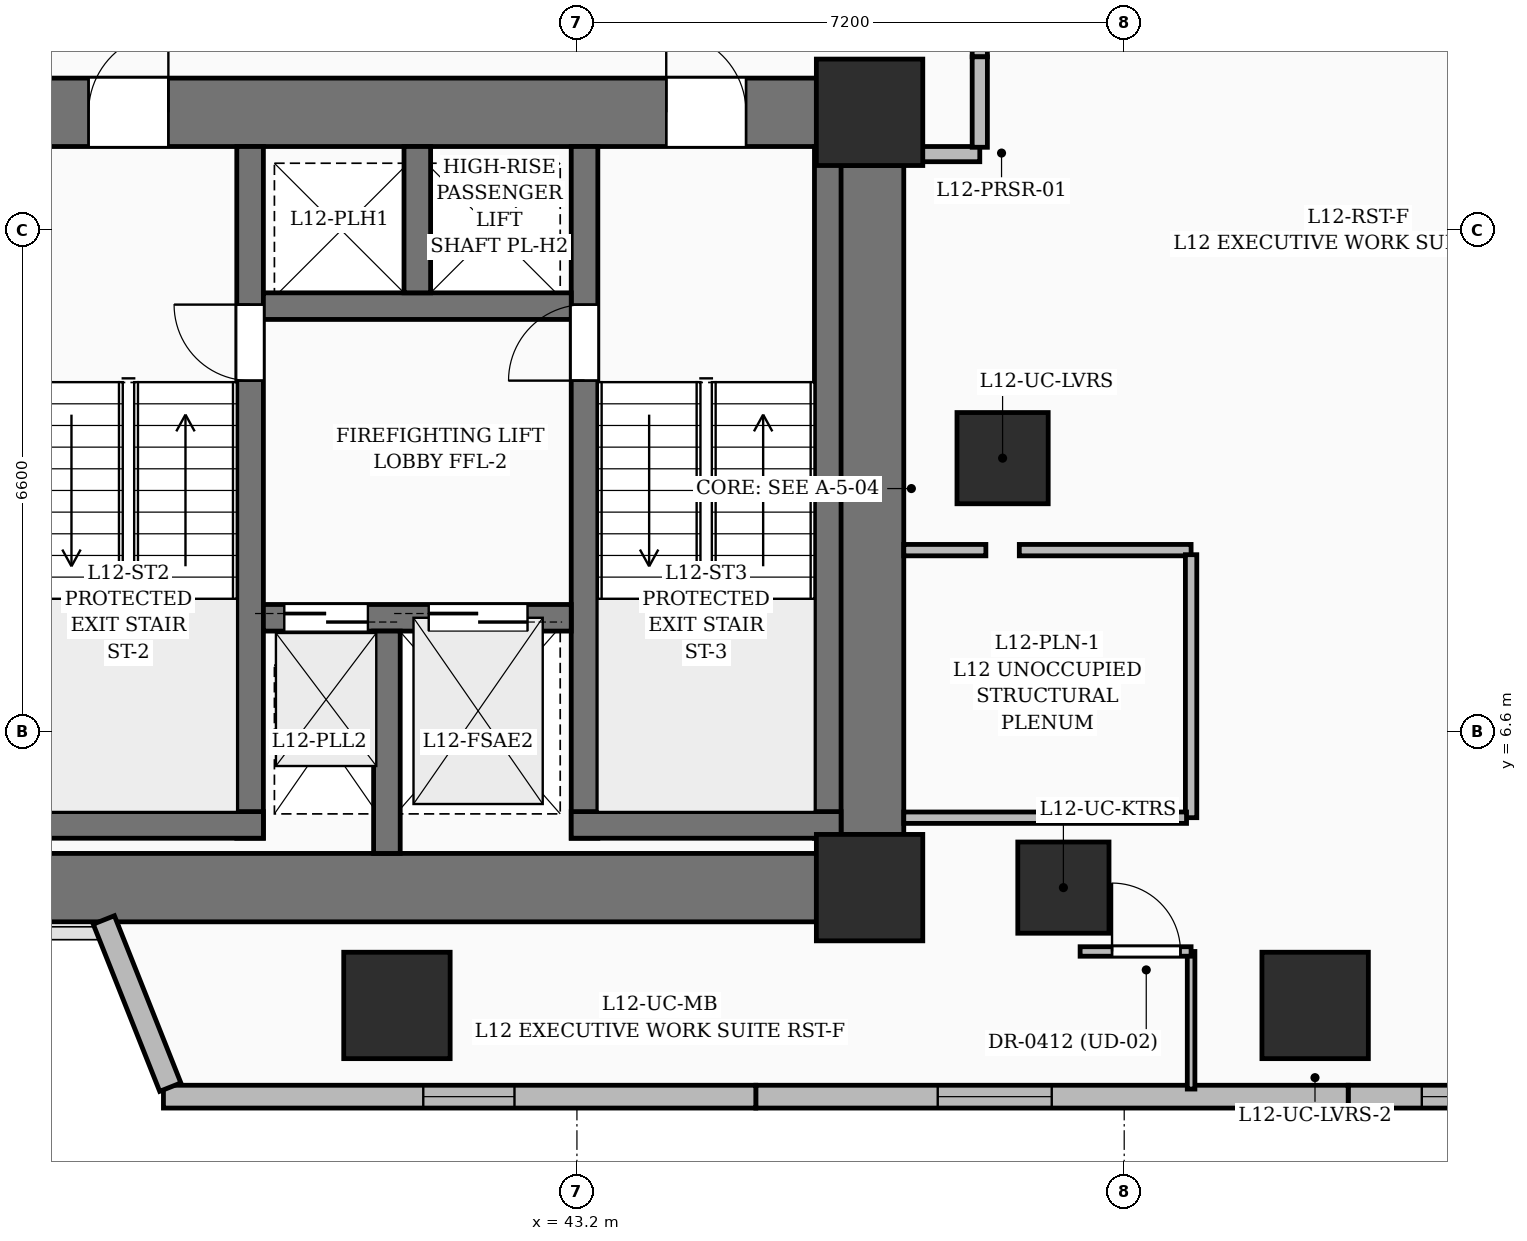
"""IFC4 building model, lengths in metres.
Left out: names, types, materials, properties, quantities, classifications, styles, units other than length and angle.
Written with IfcOpenShell. Run it as: python <this file> out.ifc"""

import sys

from ifc_helpers import new_model, si_unit, direction, frame, frame_2d, origin, origin_2d, place, context, subcontext, project, spatial, rectangle, extrude, element, fill, save


model = new_model("IFC4")
c1 = context("Model", 3, precision=1e-05, world=origin(), true_north=direction((0.0, 1.0)))
c2 = subcontext(c1, "Body", "Model", "MODEL_VIEW")
j1 = project(units=[si_unit("LENGTHUNIT", "METRE"), si_unit("PLANEANGLEUNIT", "RADIAN")], contexts=[c1])
p1 = place(None, origin())
s1 = spatial("IfcSite", under=j1, at=p1, CompositionType="ELEMENT")
p2 = place(p1, origin())
s2 = spatial("IfcBuilding", under=s1, at=p2, CompositionType="ELEMENT")
p3 = place(p2, frame((0.0, 0.0, 53.4)))
s3 = spatial("IfcBuildingStorey", under=s2, at=p3, CompositionType="ELEMENT", Elevation=53.4)
for number, where, z_axis, x_axis in (
    (1, (47.05, 4.55, 0.0), (0.0, 0.0, 1.0), (1.0, 0.0, 0.0)),
    (2, (47.05, 14.75, 0.0), (0.0, 0.0, 1.0), (1.0, 0.0, 0.0)),
):
    element("IfcColumn", number, at=place(p3, frame(where, z_axis=z_axis, x_axis=x_axis)), inside=s3, PredefinedType="COLUMN", context=c2, shape_type="SweptSolid", body=[
        extrude(rectangle(XDim=1.4, YDim=1.4, at=origin_2d()), origin(), (0.0, 0.0, 1.0), 3.6),
    ])
for number, where, z_axis, x_axis in (
    (3, (49.6, 4.55, 0.0), (0.0, 0.0, 1.0), (1.0, 0.0, 0.0)),
    (4, (48.8, 10.2, 0.0), (0.0, 0.0, 1.0), (1.0, 0.0, 0.0)),
):
    element("IfcColumn", number, at=place(p3, frame(where, z_axis=z_axis, x_axis=x_axis)), inside=s3, PredefinedType="COLUMN", context=c2, shape_type="SweptSolid", body=[
        extrude(rectangle(XDim=1.2, YDim=1.2, at=origin_2d()), origin(), (0.0, 0.0, 1.0), 3.6),
    ])
p4 = place(p3, frame((35.85, 4.55, 0.0), z_axis=(0.0, 0.0, 1.0), x_axis=(1.0, 0.0, 0.0)))
e5 = element("IfcWall", 5, at=p4, inside=s3, PredefinedType="SHEAR", context=c2, shape_type="SweptSolid", body=[
    extrude(rectangle(XDim=10.5, YDim=0.9, at=frame_2d((5.25, 0.0))), origin(), (0.0, 0.0, 1.0), 3.6),
])
p5 = place(p3, frame((35.85, 14.75, 0.0), z_axis=(0.0, 0.0, 1.0), x_axis=(1.0, 0.0, 0.0)))
e6 = element("IfcWall", 6, at=p5, inside=s3, PredefinedType="SHEAR", context=c2, shape_type="SweptSolid", body=[
    extrude(rectangle(XDim=10.5, YDim=0.9, at=frame_2d((5.25, 0.0))), origin(), (0.0, 0.0, 1.0), 3.6),
])
p6 = place(p5, frame((0.925, 0.0, 0.0)))
e7 = element("IfcOpeningElement", 7, at=p6, cuts=e6, PredefinedType="OPENING", context=c2, shape_type="SweptSolid", body=[
    extrude(rectangle(XDim=1.05, YDim=2.15, at=frame_2d((0.525, 1.075))), frame((0.0, 0.46, 0.0), z_axis=(0.0, -1.0, 0.0), x_axis=(1.0, 0.0, 0.0)), (0.0, 0.0, 1.0), 0.92),
])
p7 = place(p5, frame((8.525, 0.0, 0.0)))
e8 = element("IfcOpeningElement", 8, at=p7, cuts=e6, PredefinedType="OPENING", context=c2, shape_type="SweptSolid", body=[
    extrude(rectangle(XDim=1.05, YDim=2.15, at=frame_2d((0.525, 1.075))), frame((0.0, 0.46, 0.0), z_axis=(0.0, -1.0, 0.0), x_axis=(1.0, 0.0, 0.0)), (0.0, 0.0, 1.0), 0.92),
])
p8 = place(p3, frame((47.05, 5.25, 0.0), z_axis=(0.0, 0.0, 1.0), x_axis=(0.0, 1.0, 0.0)))
e9 = element("IfcWall", 9, at=p8, inside=s3, PredefinedType="SHEAR", context=c2, shape_type="SweptSolid", body=[
    extrude(rectangle(XDim=8.8, YDim=0.9, at=frame_2d((4.4, 0.0))), origin(), (0.0, 0.0, 1.0), 3.6),
])
p9 = place(p3, frame((38.9, 5.2, 0.0), z_axis=(0.0, 0.0, 1.0), x_axis=(0.0, 1.0, 0.0)))
e10 = element("IfcWall", 10, at=p9, inside=s3, PredefinedType="SOLIDWALL", context=c2, shape_type="SweptSolid", body=[
    extrude(rectangle(XDim=9.1, YDim=0.35, at=frame_2d((4.55, 0.0))), origin(), (0.0, 0.0, 1.0), 3.6),
])
p10 = place(p9, frame((6.02, 0.0, 0.0)))
e11 = element("IfcOpeningElement", 11, at=p10, cuts=e10, PredefinedType="OPENING", context=c2, shape_type="SweptSolid", body=[
    extrude(rectangle(XDim=1.0, YDim=2.15, at=frame_2d((0.5, 1.075))), frame((0.0, 0.185, 0.0), z_axis=(0.0, -1.0, 0.0), x_axis=(1.0, 0.0, 0.0)), (0.0, 0.0, 1.0), 0.37),
])
p11 = place(p3, frame((35.525, 5.375, 0.0), z_axis=(0.0, 0.0, 1.0), x_axis=(1.0, 0.0, 0.0)))
e12 = element("IfcWall", 12, at=p11, inside=s3, PredefinedType="SOLIDWALL", context=c2, shape_type="SweptSolid", body=[
    extrude(rectangle(XDim=3.55, YDim=0.35, at=frame_2d((1.775, 0.0))), origin(), (0.0, 0.0, 1.0), 3.6),
])
p12 = place(p3, frame((43.3, 5.2, 0.0), z_axis=(0.0, 0.0, 1.0), x_axis=(0.0, 1.0, 0.0)))
e13 = element("IfcWall", 13, at=p12, inside=s3, PredefinedType="SOLIDWALL", context=c2, shape_type="SweptSolid", body=[
    extrude(rectangle(XDim=9.1, YDim=0.35, at=frame_2d((4.55, 0.0))), origin(), (0.0, 0.0, 1.0), 3.6),
])
p13 = place(p12, frame((6.02, 0.0, 0.0)))
e14 = element("IfcOpeningElement", 14, at=p13, cuts=e13, PredefinedType="OPENING", context=c2, shape_type="SweptSolid", body=[
    extrude(rectangle(XDim=1.0, YDim=2.15, at=frame_2d((0.5, 1.075))), frame((0.0, 0.185, 0.0), z_axis=(0.0, -1.0, 0.0), x_axis=(1.0, 0.0, 0.0)), (0.0, 0.0, 1.0), 0.37),
])
p14 = place(p3, frame((46.5, 5.2, 0.0), z_axis=(0.0, 0.0, 1.0), x_axis=(0.0, 1.0, 0.0)))
e15 = element("IfcWall", 15, at=p14, inside=s3, PredefinedType="SOLIDWALL", context=c2, shape_type="SweptSolid", body=[
    extrude(rectangle(XDim=9.1, YDim=0.35, at=frame_2d((4.55, 0.0))), origin(), (0.0, 0.0, 1.0), 3.6),
])
p15 = place(p3, frame((43.125, 5.375, 0.0), z_axis=(0.0, 0.0, 1.0), x_axis=(1.0, 0.0, 0.0)))
e16 = element("IfcWall", 16, at=p15, inside=s3, PredefinedType="SOLIDWALL", context=c2, shape_type="SweptSolid", body=[
    extrude(rectangle(XDim=3.55, YDim=0.35, at=frame_2d((1.775, 0.0))), origin(), (0.0, 0.0, 1.0), 3.6),
])
p16 = place(p3, frame((39.075, 8.1, 0.0), z_axis=(0.0, 0.0, 1.0), x_axis=(1.0, 0.0, 0.0)))
e17 = element("IfcWall", 17, at=p16, inside=s3, PredefinedType="SOLIDWALL", context=c2, shape_type="SweptSolid", body=[
    extrude(rectangle(XDim=4.05, YDim=0.35, at=frame_2d((2.025, 0.0))), origin(), (0.0, 0.0, 1.0), 3.6),
])
p17 = place(p16, frame((2.175, 0.0, 0.0)))
e18 = element("IfcOpeningElement", 18, at=p17, cuts=e17, PredefinedType="OPENING", context=c2, shape_type="SweptSolid", body=[
    extrude(rectangle(XDim=1.3, YDim=2.25, at=frame_2d((0.65, 1.125))), frame((0.0, 0.185, 0.0), z_axis=(0.0, -1.0, 0.0), x_axis=(1.0, 0.0, 0.0)), (0.0, 0.0, 1.0), 0.37),
])
p18 = place(p16, frame((0.275, 0.0, 0.0)))
e19 = element("IfcOpeningElement", 19, at=p18, cuts=e17, PredefinedType="OPENING", context=c2, shape_type="SweptSolid", body=[
    extrude(rectangle(XDim=1.1, YDim=2.2, at=frame_2d((0.55, 1.1))), frame((0.0, 0.185, 0.0), z_axis=(0.0, -1.0, 0.0), x_axis=(1.0, 0.0, 0.0)), (0.0, 0.0, 1.0), 0.37),
])
p19 = place(p3, frame((40.7, 5.0, 0.0), z_axis=(0.0, 0.0, 1.0), x_axis=(0.0, 1.0, 0.0)))
e20 = element("IfcWall", 20, at=p19, inside=s3, PredefinedType="SOLIDWALL", context=c2, shape_type="SweptSolid", body=[
    extrude(rectangle(XDim=2.925, YDim=0.35, at=frame_2d((1.462, 0.0))), origin(), (0.0, 0.0, 1.0), 3.6),
])
p20 = place(p3, frame((39.075, 12.2, 0.0), z_axis=(0.0, 0.0, 1.0), x_axis=(1.0, 0.0, 0.0)))
e21 = element("IfcWall", 21, at=p20, inside=s3, PredefinedType="SOLIDWALL", context=c2, shape_type="SweptSolid", body=[
    extrude(rectangle(XDim=4.05, YDim=0.35, at=frame_2d((2.025, 0.0))), origin(), (0.0, 0.0, 1.0), 3.6),
])
p21 = place(p3, frame((41.1, 12.375, 0.0), z_axis=(0.0, 0.0, 1.0), x_axis=(0.0, 1.0, 0.0)))
e22 = element("IfcWall", 22, at=p21, inside=s3, PredefinedType="SOLIDWALL", context=c2, shape_type="SweptSolid", body=[
    extrude(rectangle(XDim=1.925, YDim=0.35, at=frame_2d((0.962, 0.0))), origin(), (0.0, 0.0, 1.0), 3.6),
])
for number, where, z_axis, x_axis in (
    (23, (40.832, 3.0, 0.0), (0.0, 0.0, 1.0), (1.0, 0.0, 0.0)),
    (24, (52.912, 3.0, 0.0), (0.0, 0.0, 1.0), (1.0, 0.0, 0.0)),
):
    element("IfcColumn", number, at=place(p3, frame(where, z_axis=z_axis, x_axis=x_axis)), inside=s3, PredefinedType="COLUMN", context=c2, shape_type="SweptSolid", body=[
        extrude(rectangle(XDim=1.4, YDim=1.4, at=origin_2d()), origin(), (0.0, 0.0, 1.0), 3.6),
    ])
p22 = place(p3, frame((60.535, 1.8, 0.0), z_axis=(0.0, 0.0, 1.0), x_axis=(-1.0, 0.0, 0.0)))
e25 = element("IfcWall", 25, at=p22, inside=s3, PredefinedType="SOLIDWALL", context=c2, shape_type="SweptSolid", body=[
    extrude(rectangle(XDim=7.188, YDim=0.3, at=frame_2d((3.594, 0.0))), origin(), (0.0, 0.0, 1.0), 3.35),
])
p23 = place(p22, frame((4.62, 0.0, 0.55)))
e26 = element("IfcOpeningElement", 26, at=p23, cuts=e25, PredefinedType="OPENING", context=c2, shape_type="SweptSolid", body=[
    extrude(rectangle(XDim=1.6, YDim=2.2, at=frame_2d((0.8, 1.1))), frame((0.0, 0.16, 0.0), z_axis=(0.0, -1.0, 0.0), x_axis=(1.0, 0.0, 0.0)), (0.0, 0.0, 1.0), 0.32),
])
p24 = place(p22, frame((1.745, 0.0, 0.55)))
e27 = element("IfcOpeningElement", 27, at=p24, cuts=e25, PredefinedType="OPENING", context=c2, shape_type="SweptSolid", body=[
    extrude(rectangle(XDim=1.6, YDim=2.2, at=frame_2d((0.8, 1.1))), frame((0.0, 0.16, 0.0), z_axis=(0.0, -1.0, 0.0), x_axis=(1.0, 0.0, 0.0)), (0.0, 0.0, 1.0), 0.32),
])
p25 = place(p3, frame((53.347, 1.8, 0.0), z_axis=(0.0, 0.0, 1.0), x_axis=(-1.0, 0.0, 0.0)))
e28 = element("IfcWall", 28, at=p25, inside=s3, PredefinedType="SOLIDWALL", context=c2, shape_type="SweptSolid", body=[
    extrude(rectangle(XDim=7.793, YDim=0.3, at=frame_2d((3.897, 0.0))), origin(), (0.0, 0.0, 1.0), 3.35),
])
p26 = place(p25, frame((3.9, 0.0, 0.6)))
e29 = element("IfcOpeningElement", 29, at=p26, cuts=e28, PredefinedType="OPENING", context=c2, shape_type="SweptSolid", body=[
    extrude(rectangle(XDim=1.5, YDim=2.1, at=frame_2d((0.75, 1.05))), frame((0.0, 0.16, 0.0), z_axis=(0.0, -1.0, 0.0), x_axis=(1.0, 0.0, 0.0)), (0.0, 0.0, 1.0), 0.32),
])
p27 = place(p3, frame((45.553, 1.8, 0.0), z_axis=(0.0, 0.0, 1.0), x_axis=(-1.0, 0.0, 0.0)))
e30 = element("IfcWall", 30, at=p27, inside=s3, PredefinedType="SOLIDWALL", context=c2, shape_type="SweptSolid", body=[
    extrude(rectangle(XDim=7.793, YDim=0.3, at=frame_2d((3.896, 0.0))), origin(), (0.0, 0.0, 1.0), 3.35),
])
p28 = place(p27, frame((3.175, 0.0, 0.8)))
e31 = element("IfcOpeningElement", 31, at=p28, cuts=e30, PredefinedType="OPENING", context=c2, shape_type="SweptSolid", body=[
    extrude(rectangle(XDim=1.2, YDim=1.8, at=frame_2d((0.6, 0.9))), frame((0.0, 0.16, 0.0), z_axis=(0.0, -1.0, 0.0), x_axis=(1.0, 0.0, 0.0)), (0.0, 0.0, 1.0), 0.32),
])
p29 = place(p3, frame((37.85, 1.925, 0.0), z_axis=(0.0, 0.0, 1.0), x_axis=(-0.36946923074, 0.92924296475, 0.0)))
e32 = element("IfcWall", 32, at=p29, inside=s3, PredefinedType="SOLIDWALL", context=c2, shape_type="SweptSolid", body=[
    extrude(rectangle(XDim=2.367, YDim=0.3, at=frame_2d((1.184, 0.0))), origin(), (0.0, 0.0, 1.0), 2.3),
])
p30 = place(p3, frame((47.5, 14.2, 0.0), z_axis=(0.0, 0.0, 1.0), x_axis=(1.0, 0.0, 0.0)))
e33 = element("IfcWall", 33, at=p30, inside=s3, PredefinedType="PARTITIONING", context=c2, shape_type="SweptSolid", body=[
    extrude(rectangle(XDim=1.0, YDim=0.2, at=frame_2d((0.5, 0.0))), origin(), (0.0, 0.0, 1.0), 3.35),
])
p31 = place(p3, frame((48.5, 15.48, 0.0), z_axis=(0.0, 0.0, 1.0), x_axis=(0.0, 1.0, 0.0)))
e34 = element("IfcWall", 34, at=p31, inside=s3, PredefinedType="PARTITIONING", context=c2, shape_type="SweptSolid", body=[
    extrude(rectangle(XDim=2.27, YDim=0.2, at=frame_2d((1.135, 0.0))), origin(), (0.0, 0.0, 1.0), 2.279),
])
p32 = place(p31, frame((0.685, 0.0, 0.0)))
e35 = element("IfcOpeningElement", 35, at=p32, cuts=e34, PredefinedType="OPENING", context=c2, shape_type="SweptSolid", body=[
    extrude(rectangle(XDim=0.9, YDim=2.1, at=frame_2d((0.45, 1.05))), frame((0.0, 0.11, 0.0), z_axis=(0.0, -1.0, 0.0), x_axis=(1.0, 0.0, 0.0)), (0.0, 0.0, 1.0), 0.22),
])
p33 = place(p3, frame((47.5, 8.99, 0.0), z_axis=(0.0, 0.0, 1.0), x_axis=(1.0, 0.0, 0.0)))
e36 = element("IfcWall", 36, at=p33, inside=s3, PredefinedType="PARTITIONING", context=c2, shape_type="SweptSolid", body=[
    extrude(rectangle(XDim=1.08, YDim=0.15, at=frame_2d((0.54, 0.0))), origin(), (0.0, 0.0, 1.0), 2.309),
])
p34 = place(p3, frame((49.02, 8.99, 0.0), z_axis=(0.0, 0.0, 1.0), x_axis=(1.0, 0.0, 0.0)))
e37 = element("IfcWall", 37, at=p34, inside=s3, PredefinedType="PARTITIONING", context=c2, shape_type="SweptSolid", body=[
    extrude(rectangle(XDim=2.26, YDim=0.15, at=frame_2d((1.13, 0.0))), origin(), (0.0, 0.0, 1.0), 3.01),
])
p35 = place(p3, frame((51.28, 8.93, 0.0), z_axis=(0.0, 0.0, 1.0), x_axis=(0.0, -1.0, 0.0)))
e38 = element("IfcWall", 38, at=p35, inside=s3, PredefinedType="PARTITIONING", context=c2, shape_type="SweptSolid", body=[
    extrude(rectangle(XDim=3.46, YDim=0.15, at=frame_2d((1.73, 0.0))), origin(), (0.0, 0.0, 1.0), 3.01),
])
p36 = place(p3, frame((51.28, 3.71, 0.0), z_axis=(0.0, 0.0, 1.0), x_axis=(0.0, -1.0, 0.0)))
e39 = element("IfcWall", 39, at=p36, inside=s3, PredefinedType="PARTITIONING", context=c2, shape_type="SweptSolid", body=[
    extrude(rectangle(XDim=1.81, YDim=0.1, at=frame_2d((0.905, 0.0))), origin(), (0.0, 0.0, 1.0), 2.279),
])
p37 = place(p3, frame((47.5, 5.47, 0.0), z_axis=(0.0, 0.0, 1.0), x_axis=(1.0, 0.0, 0.0)))
e40 = element("IfcWall", 40, at=p37, inside=s3, PredefinedType="PARTITIONING", context=c2, shape_type="SweptSolid", body=[
    extrude(rectangle(XDim=3.72, YDim=0.15, at=frame_2d((1.86, 0.0))), origin(), (0.0, 0.0, 1.0), 2.309),
])
p38 = place(p3, frame((49.82, 3.71, 0.0), z_axis=(0.0, 0.0, 1.0), x_axis=(1.0, 0.0, 0.0)))
e41 = element("IfcWall", 41, at=p38, inside=s3, PredefinedType="PARTITIONING", context=c2, shape_type="SweptSolid", body=[
    extrude(rectangle(XDim=1.46, YDim=0.125, at=frame_2d((0.73, 0.0))), origin(), (0.0, 0.0, 1.0), 2.279),
])
p39 = place(p38, frame((0.42, 0.0, 0.0)))
e42 = element("IfcOpeningElement", 42, at=p39, cuts=e41, PredefinedType="OPENING", context=c2, shape_type="SweptSolid", body=[
    extrude(rectangle(XDim=0.9, YDim=2.15, at=frame_2d((0.45, 1.075))), frame((0.0, 0.072, 0.0), z_axis=(0.0, -1.0, 0.0), x_axis=(1.0, 0.0, 0.0)), (0.0, 0.0, 1.0), 0.145),
])
p40 = place(p3, frame((48.5, 14.29, 0.0), z_axis=(0.0, 0.0, 1.0), x_axis=(0.0, 1.0, 0.0)))
e43 = element("IfcWall", 43, at=p40, inside=s3, PredefinedType="PARTITIONING", context=c2, shape_type="SweptSolid", body=[
    extrude(rectangle(XDim=1.19, YDim=0.2, at=frame_2d((0.595, 0.0))), origin(), (0.0, 0.0, 1.0), 3.35),
])
p41 = place(p23, origin())
e44 = element("IfcWindow", 44, at=p41, inside=s3, PartitioningType="SINGLE_PANEL", PredefinedType="WINDOW", context=c2, shape_type="SweptSolid", body=[
    extrude(rectangle(XDim=1.6, YDim=2.2, at=frame_2d((0.8, 1.1))), frame((0.0, 0.03, 0.0), z_axis=(0.0, -1.0, 0.0), x_axis=(1.0, 0.0, 0.0)), (0.0, 0.0, 1.0), 0.06),
])
fill(e26, e44)
p42 = place(p26, origin())
e45 = element("IfcWindow", 45, at=p42, inside=s3, PartitioningType="SINGLE_PANEL", PredefinedType="WINDOW", context=c2, shape_type="SweptSolid", body=[
    extrude(rectangle(XDim=1.5, YDim=2.1, at=frame_2d((0.75, 1.05))), frame((0.0, 0.03, 0.0), z_axis=(0.0, -1.0, 0.0), x_axis=(1.0, 0.0, 0.0)), (0.0, 0.0, 1.0), 0.06),
])
fill(e29, e45)
p43 = place(p28, origin())
e46 = element("IfcWindow", 46, at=p43, inside=s3, PartitioningType="SINGLE_PANEL", PredefinedType="WINDOW", context=c2, shape_type="SweptSolid", body=[
    extrude(rectangle(XDim=1.2, YDim=1.8, at=frame_2d((0.6, 0.9))), frame((0.0, 0.03, 0.0), z_axis=(0.0, -1.0, 0.0), x_axis=(1.0, 0.0, 0.0)), (0.0, 0.0, 1.0), 0.06),
])
fill(e31, e46)
p44 = place(p6, origin())
e47 = element("IfcDoor", 47, at=p44, inside=s3, OperationType="SINGLE_SWING_RIGHT", PredefinedType="DOOR", context=c2, shape_type="SweptSolid", body=[
    extrude(rectangle(XDim=1.05, YDim=2.15, at=frame_2d((0.525, 1.075))), frame((0.0, 0.025, 0.0), z_axis=(0.0, -1.0, 0.0), x_axis=(1.0, 0.0, 0.0)), (0.0, 0.0, 1.0), 0.05),
])
fill(e7, e47)
p45 = place(p7, origin())
e48 = element("IfcDoor", 48, at=p45, inside=s3, OperationType="SINGLE_SWING_LEFT", PredefinedType="DOOR", context=c2, shape_type="SweptSolid", body=[
    extrude(rectangle(XDim=1.05, YDim=2.15, at=frame_2d((0.525, 1.075))), frame((0.0, 0.025, 0.0), z_axis=(0.0, -1.0, 0.0), x_axis=(1.0, 0.0, 0.0)), (0.0, 0.0, 1.0), 0.05),
])
fill(e8, e48)
p46 = place(p10, origin())
e49 = element("IfcDoor", 49, at=p46, inside=s3, OperationType="SINGLE_SWING_RIGHT", PredefinedType="DOOR", context=c2, shape_type="SweptSolid", body=[
    extrude(rectangle(XDim=1.0, YDim=2.15, at=frame_2d((0.5, 1.075))), frame((0.0, 0.025, 0.0), z_axis=(0.0, -1.0, 0.0), x_axis=(1.0, 0.0, 0.0)), (0.0, 0.0, 1.0), 0.05),
])
fill(e11, e49)
p47 = place(p13, origin())
e50 = element("IfcDoor", 50, at=p47, inside=s3, OperationType="SINGLE_SWING_LEFT", PredefinedType="DOOR", context=c2, shape_type="SweptSolid", body=[
    extrude(rectangle(XDim=1.0, YDim=2.15, at=frame_2d((0.5, 1.075))), frame((0.0, 0.025, 0.0), z_axis=(0.0, -1.0, 0.0), x_axis=(1.0, 0.0, 0.0)), (0.0, 0.0, 1.0), 0.05),
])
fill(e14, e50)
p48 = place(p17, origin())
e51 = element("IfcDoor", 51, at=p48, inside=s3, OperationType="DOUBLE_DOOR_SLIDING", PredefinedType="DOOR", context=c2, shape_type="SweptSolid", body=[
    extrude(rectangle(XDim=1.3, YDim=2.25, at=frame_2d((0.65, 1.125))), frame((0.0, 0.025, 0.0), z_axis=(0.0, -1.0, 0.0), x_axis=(1.0, 0.0, 0.0)), (0.0, 0.0, 1.0), 0.05),
])
fill(e18, e51)
p49 = place(p18, origin())
e52 = element("IfcDoor", 52, at=p49, inside=s3, OperationType="DOUBLE_DOOR_SLIDING", PredefinedType="DOOR", context=c2, shape_type="SweptSolid", body=[
    extrude(rectangle(XDim=1.1, YDim=2.2, at=frame_2d((0.55, 1.1))), frame((0.0, 0.025, 0.0), z_axis=(0.0, -1.0, 0.0), x_axis=(1.0, 0.0, 0.0)), (0.0, 0.0, 1.0), 0.05),
])
fill(e19, e52)
p50 = place(p39, origin())
e53 = element("IfcDoor", 53, at=p50, inside=s3, OperationType="SINGLE_SWING_LEFT", PredefinedType="DOOR", context=c2, shape_type="SweptSolid", body=[
    extrude(rectangle(XDim=0.9, YDim=2.15, at=frame_2d((0.45, 1.075))), frame((0.0, 0.025, 0.0), z_axis=(0.0, -1.0, 0.0), x_axis=(1.0, 0.0, 0.0)), (0.0, 0.0, 1.0), 0.05),
])
fill(e42, e53)
save(model, sys.argv[1])
